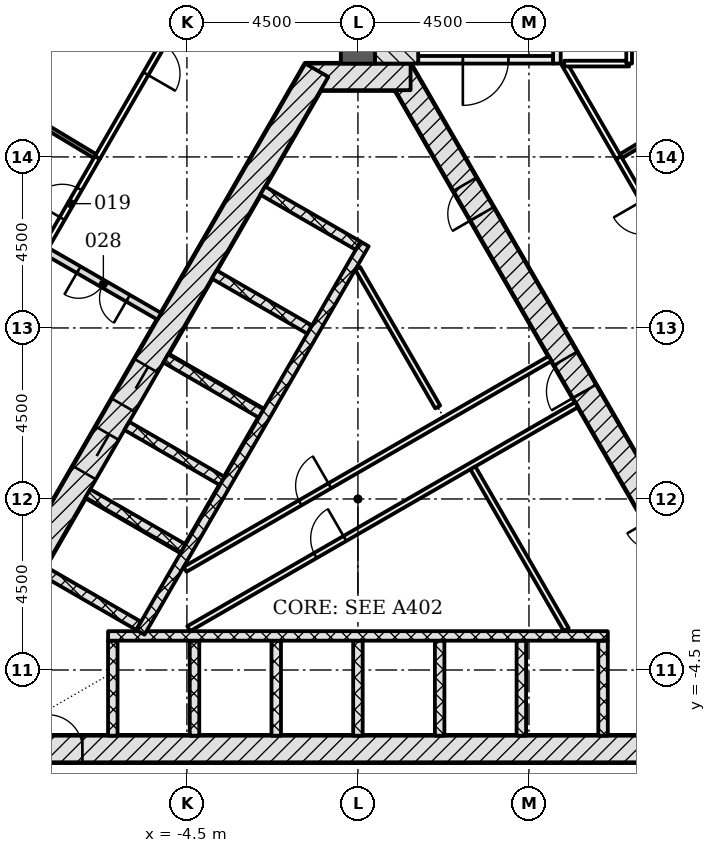
"""IFC4 building model, lengths in metres.
Left out: names, types, materials, properties, quantities, classifications, styles, units other than length and angle.
Written with IfcOpenShell. Run it as: python <this file> out.ifc"""

import sys

from ifc_helpers import new_model, si_unit, direction, frame, frame_2d, origin, place, context, subcontext, project, spatial, rectangle, extrude, element, fill, save


model = new_model("IFC4")
c1 = context("Model", 3, precision=1e-05, world=origin(), true_north=direction((0.0, 1.0)))
c2 = subcontext(c1, "Body", "Model", "MODEL_VIEW")
j1 = project(units=[si_unit("LENGTHUNIT", "METRE"), si_unit("PLANEANGLEUNIT", "RADIAN")], contexts=[c1])
p1 = place(None, origin())
s1 = spatial("IfcSite", under=j1, at=p1, CompositionType="ELEMENT")
p2 = place(p1, origin())
s2 = spatial("IfcBuilding", under=s1, at=p2, CompositionType="ELEMENT")
p3 = place(p2, frame((0.0, 0.0, -4.5)))
s3 = spatial("IfcBuildingStorey", under=s2, at=p3, CompositionType="ELEMENT", Elevation=-4.5)
p4 = place(p3, frame((-9.229, -6.578, -0.3), z_axis=(0.0, 0.0, 1.0), x_axis=(1.0, 0.0, 0.0)))
e1 = element("IfcWall", 1, at=p4, inside=s3, PredefinedType="SHEAR", context=c2, shape_type="SweptSolid", body=[
    extrude(rectangle(XDim=18.458, YDim=0.7, at=frame_2d((9.229, 0.0))), origin(), (0.0, 0.0, 1.0), 4.55),
])
p5 = place(p4, frame((1.079, 0.0, 0.3)))
e2 = element("IfcOpeningElement", 2, at=p5, cuts=e1, PredefinedType="OPENING", context=c2, shape_type="SweptSolid", body=[
    extrude(rectangle(XDim=0.9, YDim=2.1, at=frame_2d((0.45, 1.05))), frame((0.0, 0.36, 0.0), z_axis=(0.0, -1.0, 0.0), x_axis=(1.0, 0.0, 0.0)), (0.0, 0.0, 1.0), 0.72),
])
p6 = place(p3, frame((10.311, -4.703, -0.3), z_axis=(0.0, 0.0, 1.0), x_axis=(-0.500001446645, 0.866024568562, 0.0)))
e3 = element("IfcWall", 3, at=p6, inside=s3, PredefinedType="SHEAR", context=c2, shape_type="SweptSolid", body=[
    extrude(rectangle(XDim=18.458, YDim=0.7, at=frame_2d((9.229, 0.0))), origin(), (0.0, 0.0, 1.0), 4.55),
])
p7 = place(p6, frame((8.7, 0.0, 0.3)))
e4 = element("IfcOpeningElement", 4, at=p7, cuts=e3, PredefinedType="OPENING", context=c2, shape_type="SweptSolid", body=[
    extrude(rectangle(XDim=1.0, YDim=2.1, at=frame_2d((0.5, 1.05))), frame((0.0, 0.36, 0.0), z_axis=(0.0, -1.0, 0.0), x_axis=(1.0, 0.0, 0.0)), (0.0, 0.0, 1.0), 0.72),
])
p8 = place(p6, frame((4.002, 0.0, 0.3)))
e5 = element("IfcOpeningElement", 5, at=p8, cuts=e3, PredefinedType="OPENING", context=c2, shape_type="SweptSolid", body=[
    extrude(rectangle(XDim=0.9, YDim=2.1, at=frame_2d((0.45, 1.05))), frame((0.0, 0.36, 0.0), z_axis=(0.0, -1.0, 0.0), x_axis=(1.0, 0.0, 0.0)), (0.0, 0.0, 1.0), 0.72),
])
p9 = place(p6, frame((14.093, 0.0, 0.3)))
e6 = element("IfcOpeningElement", 6, at=p9, cuts=e3, PredefinedType="OPENING", context=c2, shape_type="SweptSolid", body=[
    extrude(rectangle(XDim=0.9, YDim=2.1, at=frame_2d((0.45, 1.05))), frame((0.0, 0.36, 0.0), z_axis=(0.0, -1.0, 0.0), x_axis=(1.0, 0.0, 0.0)), (0.0, 0.0, 1.0), 0.72),
])
p10 = place(p3, frame((1.386, 11.106, -0.3), z_axis=(0.0, 0.0, 1.0), x_axis=(-1.0, 0.0, 0.0)))
e7 = element("IfcWall", 7, at=p10, inside=s3, PredefinedType="SHEAR", context=c2, shape_type="SweptSolid", body=[
    extrude(rectangle(XDim=2.771, YDim=0.7, at=frame_2d((1.386, 0.0))), origin(), (0.0, 0.0, 1.0), 4.55),
])
p11 = place(p3, frame((-1.083, 11.281, -0.3), z_axis=(0.0, 0.0, 1.0), x_axis=(-0.500001446645, -0.866024568562, 0.0)))
e8 = element("IfcWall", 8, at=p11, inside=s3, PredefinedType="SHEAR", context=c2, shape_type="SweptSolid", body=[
    extrude(rectangle(XDim=18.458, YDim=0.7, at=frame_2d((9.229, 0.0))), origin(), (0.0, 0.0, 1.0), 4.55),
])
p12 = place(p11, frame((8.979, 0.0, 0.3)))
e9 = element("IfcOpeningElement", 9, at=p12, cuts=e8, PredefinedType="OPENING", context=c2, shape_type="SweptSolid", body=[
    extrude(rectangle(XDim=1.2, YDim=2.1, at=frame_2d((0.6, 1.05))), frame((0.0, 0.36, 0.0), z_axis=(0.0, -1.0, 0.0), x_axis=(1.0, 0.0, 0.0)), (0.0, 0.0, 1.0), 0.72),
])
p13 = place(p11, frame((11.029, 0.0, 0.3)))
e10 = element("IfcOpeningElement", 10, at=p13, cuts=e8, PredefinedType="OPENING", context=c2, shape_type="SweptSolid", body=[
    extrude(rectangle(XDim=1.2, YDim=2.1, at=frame_2d((0.6, 1.05))), frame((0.0, 0.36, 0.0), z_axis=(0.0, -1.0, 0.0), x_axis=(1.0, 0.0, 0.0)), (0.0, 0.0, 1.0), 0.72),
])
p14 = place(p3, frame((0.0, 11.456, -0.3), z_axis=(0.0, 0.0, 1.0), x_axis=(0.0, 1.0, 0.0)))
e11 = element("IfcWall", 11, at=p14, inside=s3, PredefinedType="SHEAR", context=c2, shape_type="SweptSolid", body=[
    extrude(rectangle(XDim=14.633, YDim=0.9, at=frame_2d((7.316, 0.0))), origin(), (0.0, 0.0, 1.0), 4.55),
])
p15 = place(p14, frame((7.35, 0.0, 0.3)))
e12 = element("IfcOpeningElement", 12, at=p15, cuts=e11, PredefinedType="OPENING", context=c2, shape_type="SweptSolid", body=[
    extrude(rectangle(XDim=1.5, YDim=2.1, at=frame_2d((0.75, 1.05))), frame((0.0, 0.46, 0.0), z_axis=(0.0, -1.0, 0.0), x_axis=(1.0, 0.0, 0.0)), (0.0, 0.0, 1.0), 0.92),
])
for number, where, z_axis, x_axis in (
    (13, (-6.45, -6.228, 0.0), (0.0, 0.0, 1.0), (0.0, 1.0, 0.0)),
    (14, (-4.3, -6.228, 0.0), (0.0, 0.0, 1.0), (0.0, 1.0, 0.0)),
    (15, (-2.15, -6.228, 0.0), (0.0, 0.0, 1.0), (0.0, 1.0, 0.0)),
    (16, (0.0, -6.228, 0.0), (0.0, 0.0, 1.0), (0.0, 1.0, 0.0)),
    (17, (2.15, -6.228, 0.0), (0.0, 0.0, 1.0), (0.0, 1.0, 0.0)),
    (18, (4.3, -6.228, 0.0), (0.0, 0.0, 1.0), (0.0, 1.0, 0.0)),
    (19, (6.45, -6.228, 0.0), (0.0, 0.0, 1.0), (0.0, 1.0, 0.0)),
):
    element("IfcWall", number, at=place(p3, frame(where, z_axis=z_axis, x_axis=x_axis)), inside=s3, PredefinedType="PARTITIONING", context=c2, shape_type="SweptSolid", body=[
        extrude(rectangle(XDim=2.5, YDim=0.25, at=frame_2d((1.25, 0.0))), origin(), (0.0, 0.0, 1.0), 4.25),
    ])
p16 = place(p3, frame((-6.575, -3.603, 0.0), z_axis=(0.0, 0.0, 1.0), x_axis=(1.0, 0.0, 0.0)))
e20 = element("IfcWall", 20, at=p16, inside=s3, PredefinedType="PARTITIONING", context=c2, shape_type="SweptSolid", body=[
    extrude(rectangle(XDim=13.15, YDim=0.25, at=frame_2d((6.575, 0.0))), origin(), (0.0, 0.0, 1.0), 4.25),
])
p17 = place(p3, frame((-2.506, 8.115, 0.0), z_axis=(0.0, 0.0, 1.0), x_axis=(0.865996321171, -0.50005036918, 0.0)))
e21 = element("IfcWall", 21, at=p17, inside=s3, PredefinedType="PARTITIONING", context=c2, shape_type="SweptSolid", body=[
    extrude(rectangle(XDim=2.9, YDim=0.25, at=frame_2d((1.45, 0.0))), origin(), (0.0, 0.0, 1.0), 4.25),
])
p18 = place(p3, frame((-3.781, 5.907, 0.0), z_axis=(0.0, 0.0, 1.0), x_axis=(0.866032775405, -0.499987231761, 0.0)))
e22 = element("IfcWall", 22, at=p18, inside=s3, PredefinedType="PARTITIONING", context=c2, shape_type="SweptSolid", body=[
    extrude(rectangle(XDim=2.9, YDim=0.25, at=frame_2d((1.45, 0.0))), origin(), (0.0, 0.0, 1.0), 4.25),
])
for number, where, z_axis, x_axis in (
    (23, (-5.056, 3.699, -0.3), (0.0, 0.0, 1.0), (0.866, -0.5, 0.0)),
    (24, (-6.081, 1.923, -0.3), (0.0, 0.0, 1.0), (0.866, -0.5, 0.0)),
    (25, (-7.106, 0.148, -0.3), (0.0, 0.0, 1.0), (0.866, -0.5, 0.0)),
):
    element("IfcWall", number, at=place(p3, frame(where, z_axis=z_axis, x_axis=x_axis)), inside=s3, PredefinedType="PARTITIONING", context=c2, shape_type="SweptSolid", body=[
        extrude(rectangle(XDim=2.9, YDim=0.25, at=frame_2d((1.45, 0.0))), origin(), (0.0, 0.0, 1.0), 4.55),
    ])
p19 = place(p3, frame((-8.281, -1.887, 0.0), z_axis=(0.0, 0.0, 1.0), x_axis=(0.866032775405, -0.499987231761, 0.0)))
e26 = element("IfcWall", 26, at=p19, inside=s3, PredefinedType="PARTITIONING", context=c2, shape_type="SweptSolid", body=[
    extrude(rectangle(XDim=2.9, YDim=0.25, at=frame_2d((1.45, 0.0))), origin(), (0.0, 0.0, 1.0), 4.25),
])
p20 = place(p3, frame((0.176, 6.711, 0.0), z_axis=(0.0, 0.0, 1.0), x_axis=(-0.500004227369, -0.866022963098, 0.0)))
e27 = element("IfcWall", 27, at=p20, inside=s3, PredefinedType="PARTITIONING", context=c2, shape_type="SweptSolid", body=[
    extrude(rectangle(XDim=11.8, YDim=0.25, at=frame_2d((5.9, 0.0))), origin(), (0.0, 0.0, 1.0), 4.25),
])
p21 = place(p3, frame((-4.548, -1.851, 0.0), z_axis=(0.0, 0.0, 1.0), x_axis=(0.866023939251, 0.500002536638, 0.0)))
e28 = element("IfcWall", 28, at=p21, inside=s3, PredefinedType="PARTITIONING", context=c2, shape_type="SweptSolid", body=[
    extrude(rectangle(XDim=11.092, YDim=0.15, at=frame_2d((5.546, 0.0))), origin(), (0.0, 0.0, 1.0), 4.25),
])
p22 = place(p21, frame((3.497, 0.0, 0.0)))
e29 = element("IfcOpeningElement", 29, at=p22, cuts=e28, PredefinedType="OPENING", context=c2, shape_type="SweptSolid", body=[
    extrude(rectangle(XDim=0.9, YDim=2.1, at=frame_2d((0.45, 1.05))), frame((0.0, 0.085, 0.0), z_axis=(0.0, -1.0, 0.0), x_axis=(1.0, 0.0, 0.0)), (0.0, 0.0, 1.0), 0.17),
])
p23 = place(p3, frame((2.099, 2.42, 0.0), z_axis=(0.0, 0.0, 1.0), x_axis=(-0.499998449073, 0.866026299211, 0.0)))
e30 = element("IfcWall", 30, at=p23, inside=s3, PredefinedType="PARTITIONING", context=c2, shape_type="SweptSolid", body=[
    extrude(rectangle(XDim=4.211, YDim=0.15, at=frame_2d((2.106, 0.0))), origin(), (0.0, 0.0, 1.0), 4.25),
])
p24 = place(p3, frame((-4.454, -3.413, 0.0), z_axis=(0.0, 0.0, 1.0), x_axis=(0.86603043987, 0.499991277142, 0.0)))
e31 = element("IfcWall", 31, at=p24, inside=s3, PredefinedType="PARTITIONING", context=c2, shape_type="SweptSolid", body=[
    extrude(rectangle(XDim=11.792, YDim=0.15, at=frame_2d((5.896, 0.0))), origin(), (0.0, 0.0, 1.0), 4.25),
])
p25 = place(p24, frame((3.847, 0.0, 0.0)))
e32 = element("IfcOpeningElement", 32, at=p25, cuts=e31, PredefinedType="OPENING", context=c2, shape_type="SweptSolid", body=[
    extrude(rectangle(XDim=0.9, YDim=2.1, at=frame_2d((0.45, 1.05))), frame((0.0, 0.085, 0.0), z_axis=(0.0, -1.0, 0.0), x_axis=(1.0, 0.0, 0.0)), (0.0, 0.0, 1.0), 0.17),
])
p26 = place(p3, frame((5.482, -3.439, 0.0), z_axis=(0.0, 0.0, 1.0), x_axis=(-0.500006183238, 0.866021833861, 0.0)))
e33 = element("IfcWall", 33, at=p26, inside=s3, PredefinedType="PARTITIONING", context=c2, shape_type="SweptSolid", body=[
    extrude(rectangle(XDim=4.916, YDim=0.15, at=frame_2d((2.458, 0.0))), origin(), (0.0, 0.0, 1.0), 4.25),
])
p27 = place(p3, frame((5.135, 11.556, -0.3), z_axis=(0.0, 0.0, 1.0), x_axis=(-1.0, 0.0, 0.0)))
e34 = element("IfcWall", 34, at=p27, inside=s3, PredefinedType="SHEAR", context=c2, shape_type="SweptSolid", body=[
    extrude(rectangle(XDim=3.55, YDim=0.2, at=frame_2d((1.775, 0.0))), origin(), (0.0, 0.0, 1.0), 4.55),
])
p28 = place(p27, frame((1.175, 0.0, 0.3)))
e35 = element("IfcOpeningElement", 35, at=p28, cuts=e34, PredefinedType="OPENING", context=c2, shape_type="SweptSolid", body=[
    extrude(rectangle(XDim=1.2, YDim=2.1, at=frame_2d((0.6, 1.05))), frame((0.0, 0.11, 0.0), z_axis=(0.0, -1.0, 0.0), x_axis=(1.0, 0.0, 0.0)), (0.0, 0.0, 1.0), 0.22),
])
p29 = place(p3, frame((5.236, 11.456, -0.3), z_axis=(0.0, 0.0, 1.0), x_axis=(0.0, 1.0, 0.0)))
e36 = element("IfcWall", 36, at=p29, inside=s3, PredefinedType="SHEAR", context=c2, shape_type="SweptSolid", body=[
    extrude(rectangle(XDim=5.6, YDim=0.2, at=frame_2d((2.8, 0.0))), origin(), (0.0, 0.0, 1.0), 4.55),
])
p30 = place(p29, frame((0.45, 0.0, 0.3)))
e37 = element("IfcOpeningElement", 37, at=p30, cuts=e36, PredefinedType="OPENING", context=c2, shape_type="SweptSolid", body=[
    extrude(rectangle(XDim=1.2, YDim=2.1, at=frame_2d((0.6, 1.05))), frame((0.0, 0.11, 0.0), z_axis=(0.0, -1.0, 0.0), x_axis=(1.0, 0.0, 0.0)), (0.0, 0.0, 1.0), 0.22),
])
p31 = place(p3, frame((1.018, 11.456, -0.3), z_axis=(0.0, 0.0, 1.0), x_axis=(0.0, 1.0, 0.0)))
e38 = element("IfcWall", 38, at=p31, inside=s3, PredefinedType="SHEAR", context=c2, shape_type="SweptSolid", body=[
    extrude(rectangle(XDim=7.2, YDim=1.136, at=frame_2d((3.6, 0.0))), origin(), (0.0, 0.0, 1.0), 4.55),
])
p32 = place(p3, frame((-5.226, 4.806, 0.0), z_axis=(0.0, 0.0, 1.0), x_axis=(-0.865949687125, 0.500131122175, 0.0)))
e39 = element("IfcWall", 39, at=p32, inside=s3, PredefinedType="PARTITIONING", context=c2, shape_type="SweptSolid", body=[
    extrude(rectangle(XDim=3.499, YDim=0.2, at=frame_2d((1.75, 0.0))), origin(), (0.0, 0.0, 1.0), 4.25),
])
p33 = place(p32, frame((0.95, 0.0, 0.0)))
e40 = element("IfcOpeningElement", 40, at=p33, cuts=e39, PredefinedType="OPENING", context=c2, shape_type="SweptSolid", body=[
    extrude(rectangle(XDim=1.5, YDim=2.1, at=frame_2d((0.75, 1.05))), frame((0.0, 0.11, 0.0), z_axis=(0.0, -1.0, 0.0), x_axis=(1.0, 0.0, 0.0)), (0.0, 0.0, 1.0), 0.22),
])
p34 = place(p3, frame((9.03, 5.214, 0.0), z_axis=(0.0, 0.0, 1.0), x_axis=(-0.499876332206, 0.866096791646, 0.0)))
e41 = element("IfcWall", 41, at=p34, inside=s3, PredefinedType="PARTITIONING", context=c2, shape_type="SweptSolid", body=[
    extrude(rectangle(XDim=4.349, YDim=0.15, at=frame_2d((2.175, 0.0))), origin(), (0.0, 0.0, 1.0), 3.638),
])
p35 = place(p34, frame((1.25, 0.0, 0.0)))
e42 = element("IfcOpeningElement", 42, at=p35, cuts=e41, PredefinedType="OPENING", context=c2, shape_type="SweptSolid", body=[
    extrude(rectangle(XDim=1.8, YDim=2.1, at=frame_2d((0.9, 1.05))), frame((0.0, 0.085, 0.0), z_axis=(0.0, -1.0, 0.0), x_axis=(1.0, 0.0, 0.0)), (0.0, 0.0, 1.0), 0.17),
])
p36 = place(p3, frame((6.855, 8.982, 0.0), z_axis=(0.0, 0.0, 1.0), x_axis=(-0.500176439337, 0.865923512519, 0.0)))
e43 = element("IfcWall", 43, at=p36, inside=s3, PredefinedType="PARTITIONING", context=c2, shape_type="SweptSolid", body=[
    extrude(rectangle(XDim=2.855, YDim=0.15, at=frame_2d((1.427, 0.0))), origin(), (0.0, 0.0, 1.0), 3.638),
])
p37 = place(p3, frame((5.427, 11.456, 0.0), z_axis=(0.0, 0.0, 1.0), x_axis=(1.0, 0.0, 0.0)))
e44 = element("IfcWall", 44, at=p37, inside=s3, PredefinedType="PARTITIONING", context=c2, shape_type="SweptSolid", body=[
    extrude(rectangle(XDim=1.708, YDim=0.15, at=frame_2d((0.854, 0.0))), origin(), (0.0, 0.0, 1.0), 4.25),
])
p38 = place(p3, frame((7.136, 11.457, 0.0), z_axis=(0.0, 0.0, 1.0), x_axis=(0.0, 1.0, 0.0)))
e45 = element("IfcWall", 45, at=p38, inside=s3, PredefinedType="PARTITIONING", context=c2, shape_type="SweptSolid", body=[
    extrude(rectangle(XDim=8.106, YDim=0.15, at=frame_2d((4.053, 0.0))), origin(), (0.0, 0.0, 1.0), 3.638),
])
p39 = place(p38, frame((3.15, 0.0, 0.0)))
e46 = element("IfcOpeningElement", 46, at=p39, cuts=e45, PredefinedType="OPENING", context=c2, shape_type="SweptSolid", body=[
    extrude(rectangle(XDim=1.8, YDim=2.1, at=frame_2d((0.9, 1.05))), frame((0.0, 0.085, 0.0), z_axis=(0.0, -1.0, 0.0), x_axis=(1.0, 0.0, 0.0)), (0.0, 0.0, 1.0), 0.17),
])
p40 = place(p3, frame((-8.256, 6.558, 0.0), z_axis=(0.0, 0.0, 1.0), x_axis=(0.500081734942, 0.86597820895, 0.0)))
e47 = element("IfcWall", 47, at=p40, inside=s3, PredefinedType="PARTITIONING", context=c2, shape_type="SweptSolid", body=[
    extrude(rectangle(XDim=2.804, YDim=0.15, at=frame_2d((1.402, 0.0))), origin(), (0.0, 0.0, 1.0), 3.638),
])
p41 = place(p40, frame((0.95, 0.0, 0.0)))
e48 = element("IfcOpeningElement", 48, at=p41, cuts=e47, PredefinedType="OPENING", context=c2, shape_type="SweptSolid", body=[
    extrude(rectangle(XDim=0.9, YDim=2.1, at=frame_2d((0.45, 1.05))), frame((0.0, 0.085, 0.0), z_axis=(0.0, -1.0, 0.0), x_axis=(1.0, 0.0, 0.0)), (0.0, 0.0, 1.0), 0.17),
])
p42 = place(p3, frame((-6.857, 8.983, 0.0), z_axis=(0.0, 0.0, 1.0), x_axis=(-0.856573791655, 0.516024553147, 0.0)))
e49 = element("IfcWall", 49, at=p42, inside=s3, PredefinedType="PARTITIONING", context=c2, shape_type="SweptSolid", body=[
    extrude(rectangle(XDim=3.802, YDim=0.12, at=frame_2d((1.901, 0.0))), origin(), (0.0, 0.0, 1.0), 3.638),
])
p43 = place(p3, frame((12.736, 12.524, 0.0), z_axis=(0.0, 0.0, 1.0), x_axis=(-0.856559377083, -0.516048479827, 0.0)))
e50 = element("IfcWall", 50, at=p43, inside=s3, PredefinedType="PARTITIONING", context=c2, shape_type="SweptSolid", body=[
    extrude(rectangle(XDim=6.864, YDim=0.12, at=frame_2d((3.432, 0.0))), origin(), (0.0, 0.0, 1.0), 3.638),
])
p44 = place(p3, frame((-3.406, 14.956, 0.0), z_axis=(0.0, 0.0, 1.0), x_axis=(-0.500041102678, -0.866001671842, 0.0)))
e51 = element("IfcWall", 51, at=p44, inside=s3, PredefinedType="PARTITIONING", context=c2, shape_type="SweptSolid", body=[
    extrude(rectangle(XDim=6.897, YDim=0.15, at=frame_2d((3.449, 0.0))), origin(), (0.0, 0.0, 1.0), 3.638),
])
p45 = place(p44, frame((2.55, 0.0, 0.0)))
e52 = element("IfcOpeningElement", 52, at=p45, cuts=e51, PredefinedType="OPENING", context=c2, shape_type="SweptSolid", body=[
    extrude(rectangle(XDim=1.8, YDim=2.1, at=frame_2d((0.9, 1.05))), frame((0.0, 0.085, 0.0), z_axis=(0.0, -1.0, 0.0), x_axis=(1.0, 0.0, 0.0)), (0.0, 0.0, 1.0), 0.17),
])
p46 = place(p12, origin())
e53 = element("IfcDoor", 53, at=p46, inside=s3, OperationType="DOUBLE_DOOR_SLIDING", PredefinedType="DOOR", context=c2, shape_type="SweptSolid", body=[
    extrude(rectangle(XDim=1.2, YDim=2.1, at=frame_2d((0.6, 1.05))), frame((0.0, 0.025, 0.0), z_axis=(0.0, -1.0, 0.0), x_axis=(1.0, 0.0, 0.0)), (0.0, 0.0, 1.0), 0.05),
])
fill(e9, e53)
p47 = place(p13, origin())
e54 = element("IfcDoor", 54, at=p47, inside=s3, OperationType="DOUBLE_DOOR_SLIDING", PredefinedType="DOOR", context=c2, shape_type="SweptSolid", body=[
    extrude(rectangle(XDim=1.2, YDim=2.1, at=frame_2d((0.6, 1.05))), frame((0.0, 0.025, 0.0), z_axis=(0.0, -1.0, 0.0), x_axis=(1.0, 0.0, 0.0)), (0.0, 0.0, 1.0), 0.05),
])
fill(e10, e54)
p48 = place(p7, origin())
e55 = element("IfcDoor", 55, at=p48, inside=s3, OperationType="SINGLE_SWING_LEFT", PredefinedType="DOOR", context=c2, shape_type="SweptSolid", body=[
    extrude(rectangle(XDim=1.0, YDim=2.1, at=frame_2d((0.5, 1.05))), frame((0.0, 0.075, 0.0), z_axis=(0.0, -1.0, 0.0), x_axis=(1.0, 0.0, 0.0)), (0.0, 0.0, 1.0), 0.15),
])
fill(e4, e55)
p49 = place(p9, origin())
e56 = element("IfcDoor", 56, at=p49, inside=s3, OperationType="SINGLE_SWING_LEFT", PredefinedType="DOOR", context=c2, shape_type="SweptSolid", body=[
    extrude(rectangle(XDim=0.9, YDim=2.1, at=frame_2d((0.45, 1.05))), frame((0.0, 0.075, 0.0), z_axis=(0.0, -1.0, 0.0), x_axis=(1.0, 0.0, 0.0)), (0.0, 0.0, 1.0), 0.15),
])
fill(e6, e56)
p50 = place(p25, origin())
e57 = element("IfcDoor", 57, at=p50, inside=s3, OperationType="SINGLE_SWING_RIGHT", PredefinedType="DOOR", context=c2, shape_type="SweptSolid", body=[
    extrude(rectangle(XDim=0.9, YDim=2.1, at=frame_2d((0.45, 1.05))), frame((0.0, 0.025, 0.0), z_axis=(0.0, -1.0, 0.0), x_axis=(1.0, 0.0, 0.0)), (0.0, 0.0, 1.0), 0.05),
])
fill(e32, e57)
p51 = place(p5, origin())
e58 = element("IfcDoor", 58, at=p51, inside=s3, OperationType="SINGLE_SWING_LEFT", PredefinedType="DOOR", context=c2, shape_type="SweptSolid", body=[
    extrude(rectangle(XDim=0.9, YDim=2.1, at=frame_2d((0.45, 1.05))), frame((0.0, 0.075, 0.0), z_axis=(0.0, -1.0, 0.0), x_axis=(1.0, 0.0, 0.0)), (0.0, 0.0, 1.0), 0.15),
])
fill(e2, e58)
p52 = place(p22, origin())
e59 = element("IfcDoor", 59, at=p52, inside=s3, OperationType="SINGLE_SWING_RIGHT", PredefinedType="DOOR", context=c2, shape_type="SweptSolid", body=[
    extrude(rectangle(XDim=0.9, YDim=2.1, at=frame_2d((0.45, 1.05))), frame((0.0, 0.025, 0.0), z_axis=(0.0, -1.0, 0.0), x_axis=(1.0, 0.0, 0.0)), (0.0, 0.0, 1.0), 0.05),
])
fill(e29, e59)
p53 = place(p28, origin())
e60 = element("IfcDoor", 60, at=p53, inside=s3, OperationType="SINGLE_SWING_RIGHT", PredefinedType="DOOR", context=c2, shape_type="SweptSolid", body=[
    extrude(rectangle(XDim=1.2, YDim=2.1, at=frame_2d((0.6, 1.05))), frame((0.0, 0.025, 0.0), z_axis=(0.0, -1.0, 0.0), x_axis=(1.0, 0.0, 0.0)), (0.0, 0.0, 1.0), 0.05),
])
fill(e35, e60)
p54 = place(p41, origin())
e61 = element("IfcDoor", 61, at=p54, inside=s3, OperationType="SINGLE_SWING_LEFT", PredefinedType="DOOR", context=c2, shape_type="SweptSolid", body=[
    extrude(rectangle(XDim=0.9, YDim=2.1, at=frame_2d((0.45, 1.05))), frame((0.0, 0.025, 0.0), z_axis=(0.0, -1.0, 0.0), x_axis=(1.0, 0.0, 0.0)), (0.0, 0.0, 1.0), 0.05),
])
fill(e48, e61)
p55 = place(p45, origin())
e62 = element("IfcDoor", 62, at=p55, inside=s3, OperationType="DOUBLE_DOOR_SINGLE_SWING", PredefinedType="DOOR", context=c2, shape_type="SweptSolid", body=[
    extrude(rectangle(XDim=1.8, YDim=2.1, at=frame_2d((0.9, 1.05))), frame((0.0, 0.025, 0.0), z_axis=(0.0, -1.0, 0.0), x_axis=(1.0, 0.0, 0.0)), (0.0, 0.0, 1.0), 0.05),
])
fill(e52, e62)
p56 = place(p33, origin())
e63 = element("IfcDoor", 63, at=p56, inside=s3, OperationType="DOUBLE_DOOR_SINGLE_SWING", PredefinedType="DOOR", context=c2, shape_type="SweptSolid", body=[
    extrude(rectangle(XDim=1.5, YDim=2.1, at=frame_2d((0.75, 1.05))), frame((0.0, 0.025, 0.0), z_axis=(0.0, -1.0, 0.0), x_axis=(1.0, 0.0, 0.0)), (0.0, 0.0, 1.0), 0.05),
])
fill(e40, e63)
save(model, sys.argv[1])
